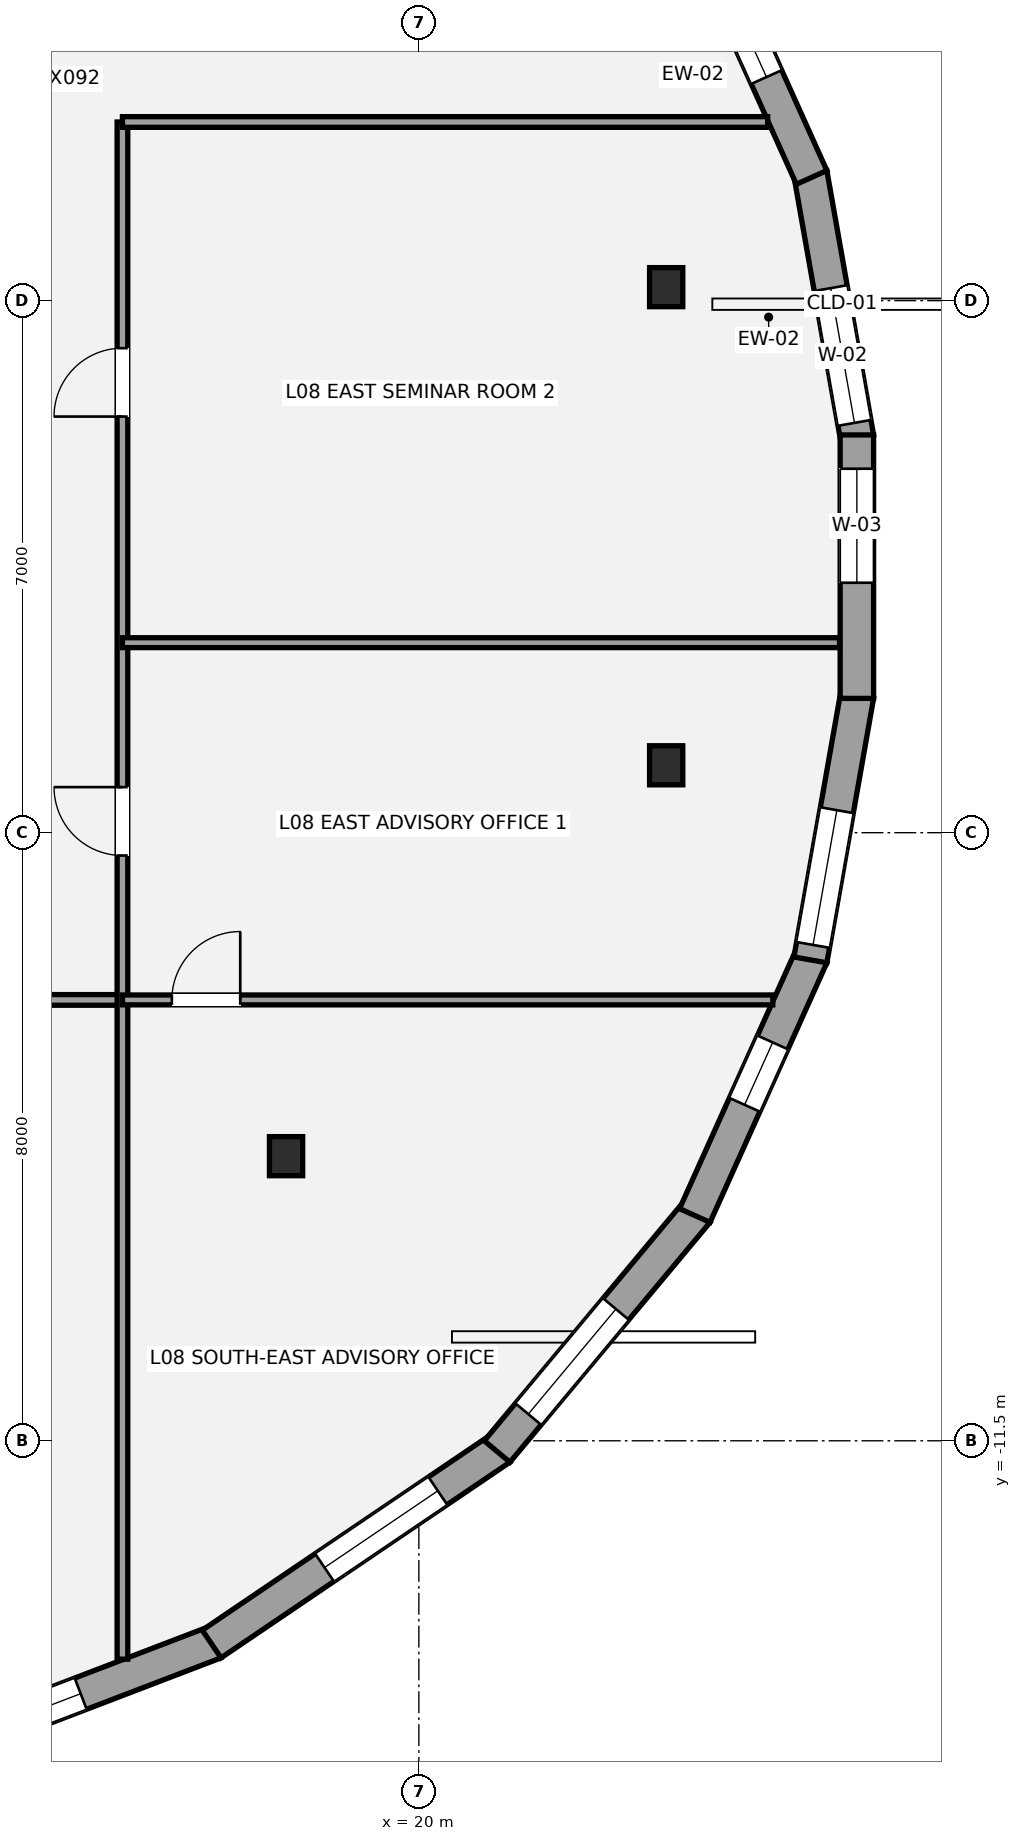
"""IFC4 building model, lengths in metres.
Left out: names, types, materials, properties, quantities, classifications, styles, units other than length and angle.
Written with IfcOpenShell. Run it as: python <this file> out.ifc"""

import sys

from ifc_helpers import new_model, si_unit, direction, frame, frame_2d, origin, origin_2d, place, context, subcontext, project, spatial, rectangle, i_section, extrude, element, fill, save


model = new_model("IFC4")
c1 = context("Model", 3, precision=1e-05, world=origin(), true_north=direction((0.0, 1.0)))
c2 = subcontext(c1, "Body", "Model", "MODEL_VIEW")
j1 = project(units=[si_unit("LENGTHUNIT", "METRE"), si_unit("PLANEANGLEUNIT", "RADIAN")], contexts=[c1])
p1 = place(None, origin())
s1 = spatial("IfcSite", under=j1, at=p1, CompositionType="ELEMENT")
p2 = place(p1, origin())
s2 = spatial("IfcBuilding", under=s1, at=p2, CompositionType="ELEMENT")
p3 = place(p2, frame((0.0, 0.0, 34.2)))
s3 = spatial("IfcBuildingStorey", under=s2, at=p3, CompositionType="ELEMENT", Elevation=34.2)
for number, where, z_axis, x_axis in (
    (1, (23.254, 3.677, 0.0), (0.0, 0.0, 1.0), (1.0, 0.0, 0.0)),
    (2, (18.253, -7.756, 0.0), (0.0, 0.0, 1.0), (1.0, 0.0, 0.0)),
    (3, (23.254, -2.613, 0.0), (0.0, 0.0, 1.0), (1.0, 0.0, 0.0)),
):
    element("IfcColumn", number, at=place(p3, frame(where, z_axis=z_axis, x_axis=x_axis)), inside=s3, PredefinedType="COLUMN", context=c2, shape_type="SweptSolid", body=[
        extrude(i_section(OverallWidth=0.437, OverallDepth=0.514, WebThickness=0.061, FlangeThickness=0.097, at=origin_2d()), origin(), (0.0, 0.0, 1.0), 3.6),
    ])
p4 = place(p3, frame((25.152, 5.173, 0.0), z_axis=(0.0, 0.0, 1.0), x_axis=(0.174041624961, -0.984738296595, 0.0)))
e4 = element("IfcWall", 4, at=p4, inside=s3, PredefinedType="STANDARD", context=c2, shape_type="SweptSolid", body=[
    extrude(rectangle(XDim=3.532, YDim=0.44, at=frame_2d((1.766, 0.0))), origin(), (0.0, 0.0, 1.0), 2.533),
])
p5 = place(p4, frame((1.532, 0.0, 0.65)))
e5 = element("IfcOpeningElement", 5, at=p5, cuts=e4, PredefinedType="OPENING", context=c2, shape_type="SweptSolid", body=[
    extrude(rectangle(XDim=1.8, YDim=1.7, at=frame_2d((0.9, 0.85))), frame((0.0, 0.23, 0.0), z_axis=(0.0, -1.0, 0.0), x_axis=(1.0, 0.0, 0.0)), (0.0, 0.0, 1.0), 0.46),
])
p6 = place(p3, frame((23.631, 8.536, 0.0), z_axis=(0.0, 0.0, 1.0), x_axis=(0.410386362845, -0.911911746383, 0.0)))
e6 = element("IfcWall", 6, at=p6, inside=s3, PredefinedType="STANDARD", context=c2, shape_type="SweptSolid", body=[
    extrude(rectangle(XDim=3.745, YDim=0.44, at=frame_2d((1.873, 0.0))), origin(), (0.0, 0.0, 1.0), 2.533),
])
p7 = place(p6, frame((1.397, 0.0, 0.92)))
e7 = element("IfcOpeningElement", 7, at=p7, cuts=e6, PredefinedType="OPENING", context=c2, shape_type="SweptSolid", body=[
    extrude(rectangle(XDim=0.9, YDim=1.35, at=frame_2d((0.45, 0.675))), frame((0.0, 0.23, 0.0), z_axis=(0.0, -1.0, 0.0), x_axis=(1.0, 0.0, 0.0)), (0.0, 0.0, 1.0), 0.46),
])
p8 = place(p3, frame((17.318, -14.15, 0.0), z_axis=(0.0, 0.0, 1.0), x_axis=(-0.933928375579, -0.357460192592, 0.0)))
e8 = element("IfcWall", 8, at=p8, inside=s3, PredefinedType="STANDARD", context=c2, shape_type="SweptSolid", body=[
    extrude(rectangle(XDim=4.989, YDim=0.44, at=frame_2d((2.494, 0.0))), origin(), (0.0, 0.0, 1.0), 2.529),
])
p9 = place(p8, frame((1.893, 0.0, 0.65)))
e9 = element("IfcOpeningElement", 9, at=p9, cuts=e8, PredefinedType="OPENING", context=c2, shape_type="SweptSolid", body=[
    extrude(rectangle(XDim=1.8, YDim=1.7, at=frame_2d((0.9, 0.85))), frame((0.0, 0.23, 0.0), z_axis=(0.0, -1.0, 0.0), x_axis=(1.0, 0.0, 0.0)), (0.0, 0.0, 1.0), 0.46),
])
p10 = place(p3, frame((21.075, -11.6, 0.0), z_axis=(0.0, 0.0, 1.0), x_axis=(-0.828003115717, -0.560723497246, 0.0)))
e10 = element("IfcWall", 10, at=p10, inside=s3, PredefinedType="STANDARD", context=c2, shape_type="SweptSolid", body=[
    extrude(rectangle(XDim=4.591, YDim=0.44, at=frame_2d((2.295, 0.0))), origin(), (0.0, 0.0, 1.0), 2.529),
])
p11 = place(p10, frame((0.997, 0.0, 0.65)))
e11 = element("IfcOpeningElement", 11, at=p11, cuts=e10, PredefinedType="OPENING", context=c2, shape_type="SweptSolid", body=[
    extrude(rectangle(XDim=1.8, YDim=1.7, at=frame_2d((0.9, 0.85))), frame((0.0, 0.23, 0.0), z_axis=(0.0, -1.0, 0.0), x_axis=(1.0, 0.0, 0.0)), (0.0, 0.0, 1.0), 0.46),
])
p12 = place(p3, frame((23.662, -8.486, 0.0), z_axis=(0.0, 0.0, 1.0), x_axis=(-0.64070435578, -0.767787684509, 0.0)))
e12 = element("IfcWall", 12, at=p12, inside=s3, PredefinedType="STANDARD", context=c2, shape_type="SweptSolid", body=[
    extrude(rectangle(XDim=4.109, YDim=0.44, at=frame_2d((2.055, 0.0))), origin(), (0.0, 0.0, 1.0), 2.533),
])
p13 = place(p12, frame((1.669, 0.0, 0.65)))
e13 = element("IfcOpeningElement", 13, at=p13, cuts=e12, PredefinedType="OPENING", context=c2, shape_type="SweptSolid", body=[
    extrude(rectangle(XDim=1.8, YDim=1.7, at=frame_2d((0.9, 0.85))), frame((0.0, 0.23, 0.0), z_axis=(0.0, -1.0, 0.0), x_axis=(1.0, 0.0, 0.0)), (0.0, 0.0, 1.0), 0.46),
])
p14 = place(p3, frame((25.167, -5.121, 0.0), z_axis=(0.0, 0.0, 1.0), x_axis=(-0.410386362845, -0.911911746383, 0.0)))
e14 = element("IfcWall", 14, at=p14, inside=s3, PredefinedType="STANDARD", context=c2, shape_type="SweptSolid", body=[
    extrude(rectangle(XDim=3.745, YDim=0.44, at=frame_2d((1.873, 0.0))), origin(), (0.0, 0.0, 1.0), 2.533),
])
p15 = place(p14, frame((1.248, 0.0, 0.58)))
e15 = element("IfcOpeningElement", 15, at=p15, cuts=e14, PredefinedType="OPENING", context=c2, shape_type="SweptSolid", body=[
    extrude(rectangle(XDim=0.9, YDim=1.35, at=frame_2d((0.45, 0.675))), frame((0.0, 0.23, 0.0), z_axis=(0.0, -1.0, 0.0), x_axis=(1.0, 0.0, 0.0)), (0.0, 0.0, 1.0), 0.46),
])
p16 = place(p3, frame((25.766, -1.695, 0.0), z_axis=(0.0, 0.0, 1.0), x_axis=(-0.174041624961, -0.984738296595, 0.0)))
e16 = element("IfcWall", 16, at=p16, inside=s3, PredefinedType="STANDARD", context=c2, shape_type="SweptSolid", body=[
    extrude(rectangle(XDim=3.532, YDim=0.44, at=frame_2d((1.766, 0.0))), origin(), (0.0, 0.0, 1.0), 2.533),
])
p17 = place(p16, frame((1.532, 0.0, 0.65)))
e17 = element("IfcOpeningElement", 17, at=p17, cuts=e16, PredefinedType="OPENING", context=c2, shape_type="SweptSolid", body=[
    extrude(rectangle(XDim=1.8, YDim=1.7, at=frame_2d((0.9, 0.85))), frame((0.0, 0.23, 0.0), z_axis=(0.0, -1.0, 0.0), x_axis=(1.0, 0.0, 0.0)), (0.0, 0.0, 1.0), 0.46),
])
p18 = place(p3, frame((25.763, 1.733, 0.0), z_axis=(0.0, 0.0, 1.0), x_axis=(0.0, -1.0, 0.0)))
e18 = element("IfcWall", 18, at=p18, inside=s3, PredefinedType="STANDARD", context=c2, shape_type="SweptSolid", body=[
    extrude(rectangle(XDim=3.466, YDim=0.44, at=frame_2d((1.733, 0.0))), origin(), (0.0, 0.0, 1.0), 2.533),
])
p19 = place(p18, frame((0.445, 0.0, 0.65)))
e19 = element("IfcOpeningElement", 19, at=p19, cuts=e18, PredefinedType="OPENING", context=c2, shape_type="SweptSolid", body=[
    extrude(rectangle(XDim=1.5, YDim=1.7, at=frame_2d((0.75, 0.85))), frame((0.0, 0.23, 0.0), z_axis=(0.0, -1.0, 0.0), x_axis=(1.0, 0.0, 0.0)), (0.0, 0.0, 1.0), 0.46),
])
p20 = place(p3, frame((-16.1, -5.7, 0.0), z_axis=(0.0, 0.0, 1.0), x_axis=(1.0, 0.0, 0.0)))
e20 = element("IfcWall", 20, at=p20, inside=s3, PredefinedType="PARTITIONING", context=c2, shape_type="SweptSolid", body=[
    extrude(rectangle(XDim=32.2, YDim=0.14, at=frame_2d((16.1, 0.0))), origin(), (0.0, 0.0, 1.0), 2.853),
])
p21 = place(p20, frame((3.6, 0.0, 0.0)))
e21 = element("IfcOpeningElement", 21, at=p21, cuts=e20, PredefinedType="OPENING", context=c2, shape_type="SweptSolid", body=[
    extrude(rectangle(XDim=0.9, YDim=2.1, at=frame_2d((0.45, 1.05))), frame((0.0, 0.08, 0.0), z_axis=(0.0, -1.0, 0.0), x_axis=(1.0, 0.0, 0.0)), (0.0, 0.0, 1.0), 0.16),
])
p22 = place(p20, frame((11.35, 0.0, 0.0)))
e22 = element("IfcOpeningElement", 22, at=p22, cuts=e20, PredefinedType="OPENING", context=c2, shape_type="SweptSolid", body=[
    extrude(rectangle(XDim=1.5, YDim=2.15, at=frame_2d((0.75, 1.075))), frame((0.0, 0.08, 0.0), z_axis=(0.0, -1.0, 0.0), x_axis=(1.0, 0.0, 0.0)), (0.0, 0.0, 1.0), 0.16),
])
p23 = place(p20, frame((19.65, 0.0, 0.0)))
e23 = element("IfcOpeningElement", 23, at=p23, cuts=e20, PredefinedType="OPENING", context=c2, shape_type="SweptSolid", body=[
    extrude(rectangle(XDim=0.9, YDim=2.1, at=frame_2d((0.45, 1.05))), frame((0.0, 0.08, 0.0), z_axis=(0.0, -1.0, 0.0), x_axis=(1.0, 0.0, 0.0)), (0.0, 0.0, 1.0), 0.16),
])
p24 = place(p20, frame((27.7, 0.0, 0.0)))
e24 = element("IfcOpeningElement", 24, at=p24, cuts=e20, PredefinedType="OPENING", context=c2, shape_type="SweptSolid", body=[
    extrude(rectangle(XDim=0.9, YDim=2.1, at=frame_2d((0.45, 1.05))), frame((0.0, 0.08, 0.0), z_axis=(0.0, -1.0, 0.0), x_axis=(1.0, 0.0, 0.0)), (0.0, 0.0, 1.0), 0.16),
])
p25 = place(p3, frame((16.1, -14.373, 0.0), z_axis=(0.0, 0.0, 1.0), x_axis=(0.0, 1.0, 0.0)))
e25 = element("IfcWall", 25, at=p25, inside=s3, PredefinedType="PARTITIONING", context=c2, shape_type="SweptSolid", body=[
    extrude(rectangle(XDim=20.223, YDim=0.14, at=frame_2d((10.111, 0.0))), origin(), (0.0, 0.0, 1.0), 2.841),
])
p26 = place(p25, frame((10.573, 0.0, 0.0)))
e26 = element("IfcOpeningElement", 26, at=p26, cuts=e25, PredefinedType="OPENING", context=c2, shape_type="SweptSolid", body=[
    extrude(rectangle(XDim=0.9, YDim=2.1, at=frame_2d((0.45, 1.05))), frame((0.0, 0.08, 0.0), z_axis=(0.0, -1.0, 0.0), x_axis=(1.0, 0.0, 0.0)), (0.0, 0.0, 1.0), 0.16),
])
p27 = place(p25, frame((16.347, 0.0, 0.0)))
e27 = element("IfcOpeningElement", 27, at=p27, cuts=e25, PredefinedType="OPENING", context=c2, shape_type="SweptSolid", body=[
    extrude(rectangle(XDim=0.9, YDim=2.1, at=frame_2d((0.45, 1.05))), frame((0.0, 0.08, 0.0), z_axis=(0.0, -1.0, 0.0), x_axis=(1.0, 0.0, 0.0)), (0.0, 0.0, 1.0), 0.16),
])
p28 = place(p3, frame((16.1, 5.85, 0.0), z_axis=(0.0, 0.0, 1.0), x_axis=(1.0, 0.0, 0.0)))
e28 = element("IfcWall", 28, at=p28, inside=s3, PredefinedType="PARTITIONING", context=c2, shape_type="SweptSolid", body=[
    extrude(rectangle(XDim=8.49, YDim=0.14, at=frame_2d((4.245, 0.0))), origin(), (0.0, 0.0, 1.0), 3.4),
])
p29 = place(p3, frame((16.1, -5.7, 0.0), z_axis=(0.0, 0.0, 1.0), x_axis=(1.0, 0.0, 0.0)))
e29 = element("IfcWall", 29, at=p29, inside=s3, PredefinedType="PARTITIONING", context=c2, shape_type="SweptSolid", body=[
    extrude(rectangle(XDim=8.557, YDim=0.13, at=frame_2d((4.278, 0.0))), origin(), (0.0, 0.0, 1.0), 2.779),
])
p30 = place(p29, frame((0.65, 0.0, 0.0)))
e30 = element("IfcOpeningElement", 30, at=p30, cuts=e29, PredefinedType="OPENING", context=c2, shape_type="SweptSolid", body=[
    extrude(rectangle(XDim=0.9, YDim=2.1, at=frame_2d((0.45, 1.05))), frame((0.0, 0.075, 0.0), z_axis=(0.0, -1.0, 0.0), x_axis=(1.0, 0.0, 0.0)), (0.0, 0.0, 1.0), 0.15),
])
p31 = place(p3, frame((16.1, -1.0, 0.0), z_axis=(0.0, 0.0, 1.0), x_axis=(1.0, 0.0, 0.0)))
e31 = element("IfcWall", 31, at=p31, inside=s3, PredefinedType="PARTITIONING", context=c2, shape_type="SweptSolid", body=[
    extrude(rectangle(XDim=9.435, YDim=0.13, at=frame_2d((4.717, 0.0))), origin(), (0.0, 0.0, 1.0), 2.841),
])
p32 = place(p5, origin())
e32 = element("IfcWindow", 32, at=p32, inside=s3, PartitioningType="SINGLE_PANEL", PredefinedType="WINDOW", context=c2, shape_type="SweptSolid", body=[
    extrude(rectangle(XDim=1.8, YDim=1.7, at=frame_2d((0.9, 0.85))), frame((0.0, -0.01, 0.0), z_axis=(0.0, -1.0, 0.0), x_axis=(1.0, 0.0, 0.0)), (0.0, 0.0, 1.0), 0.06),
])
fill(e5, e32)
p33 = place(p7, origin())
e33 = element("IfcWindow", 33, at=p33, inside=s3, PartitioningType="SINGLE_PANEL", PredefinedType="WINDOW", context=c2, shape_type="SweptSolid", body=[
    extrude(rectangle(XDim=0.9, YDim=1.35, at=frame_2d((0.45, 0.675))), frame((0.0, -0.01, 0.0), z_axis=(0.0, -1.0, 0.0), x_axis=(1.0, 0.0, 0.0)), (0.0, 0.0, 1.0), 0.06),
])
fill(e7, e33)
p34 = place(p9, origin())
e34 = element("IfcWindow", 34, at=p34, inside=s3, PartitioningType="SINGLE_PANEL", PredefinedType="WINDOW", context=c2, shape_type="SweptSolid", body=[
    extrude(rectangle(XDim=1.8, YDim=1.7, at=frame_2d((0.9, 0.85))), frame((0.0, -0.01, 0.0), z_axis=(0.0, -1.0, 0.0), x_axis=(1.0, 0.0, 0.0)), (0.0, 0.0, 1.0), 0.06),
])
fill(e9, e34)
p35 = place(p11, origin())
e35 = element("IfcWindow", 35, at=p35, inside=s3, PartitioningType="SINGLE_PANEL", PredefinedType="WINDOW", context=c2, shape_type="SweptSolid", body=[
    extrude(rectangle(XDim=1.8, YDim=1.7, at=frame_2d((0.9, 0.85))), frame((0.0, -0.01, 0.0), z_axis=(0.0, -1.0, 0.0), x_axis=(1.0, 0.0, 0.0)), (0.0, 0.0, 1.0), 0.06),
])
fill(e11, e35)
p36 = place(p13, origin())
e36 = element("IfcWindow", 36, at=p36, inside=s3, PartitioningType="SINGLE_PANEL", PredefinedType="WINDOW", context=c2, shape_type="SweptSolid", body=[
    extrude(rectangle(XDim=1.8, YDim=1.7, at=frame_2d((0.9, 0.85))), frame((0.0, -0.01, 0.0), z_axis=(0.0, -1.0, 0.0), x_axis=(1.0, 0.0, 0.0)), (0.0, 0.0, 1.0), 0.06),
])
fill(e13, e36)
p37 = place(p15, origin())
e37 = element("IfcWindow", 37, at=p37, inside=s3, PartitioningType="SINGLE_PANEL", PredefinedType="WINDOW", context=c2, shape_type="SweptSolid", body=[
    extrude(rectangle(XDim=0.9, YDim=1.35, at=frame_2d((0.45, 0.675))), frame((0.0, -0.01, 0.0), z_axis=(0.0, -1.0, 0.0), x_axis=(1.0, 0.0, 0.0)), (0.0, 0.0, 1.0), 0.06),
])
fill(e15, e37)
p38 = place(p17, origin())
e38 = element("IfcWindow", 38, at=p38, inside=s3, PartitioningType="SINGLE_PANEL", PredefinedType="WINDOW", context=c2, shape_type="SweptSolid", body=[
    extrude(rectangle(XDim=1.8, YDim=1.7, at=frame_2d((0.9, 0.85))), frame((0.0, -0.01, 0.0), z_axis=(0.0, -1.0, 0.0), x_axis=(1.0, 0.0, 0.0)), (0.0, 0.0, 1.0), 0.06),
])
fill(e17, e38)
p39 = place(p19, origin())
e39 = element("IfcWindow", 39, at=p39, inside=s3, PartitioningType="SINGLE_PANEL", PredefinedType="WINDOW", context=c2, shape_type="SweptSolid", body=[
    extrude(rectangle(XDim=1.5, YDim=1.7, at=frame_2d((0.75, 0.85))), frame((0.0, -0.01, 0.0), z_axis=(0.0, -1.0, 0.0), x_axis=(1.0, 0.0, 0.0)), (0.0, 0.0, 1.0), 0.06),
])
fill(e19, e39)
p40 = place(p30, origin())
e40 = element("IfcDoor", 40, at=p40, inside=s3, OperationType="SINGLE_SWING_RIGHT", PredefinedType="DOOR", context=c2, shape_type="SweptSolid", body=[
    extrude(rectangle(XDim=0.9, YDim=2.1, at=frame_2d((0.45, 1.05))), frame((0.0, 0.025, 0.0), z_axis=(0.0, -1.0, 0.0), x_axis=(1.0, 0.0, 0.0)), (0.0, 0.0, 1.0), 0.05),
])
fill(e30, e40)
p41 = place(p26, origin())
e41 = element("IfcDoor", 41, at=p41, inside=s3, OperationType="SINGLE_SWING_RIGHT", PredefinedType="DOOR", context=c2, shape_type="SweptSolid", body=[
    extrude(rectangle(XDim=0.9, YDim=2.1, at=frame_2d((0.45, 1.05))), frame((0.0, 0.025, 0.0), z_axis=(0.0, -1.0, 0.0), x_axis=(1.0, 0.0, 0.0)), (0.0, 0.0, 1.0), 0.05),
])
fill(e26, e41)
p42 = place(p27, origin())
e42 = element("IfcDoor", 42, at=p42, inside=s3, OperationType="SINGLE_SWING_LEFT", PredefinedType="DOOR", context=c2, shape_type="SweptSolid", body=[
    extrude(rectangle(XDim=0.9, YDim=2.1, at=frame_2d((0.45, 1.05))), frame((0.0, 0.025, 0.0), z_axis=(0.0, -1.0, 0.0), x_axis=(1.0, 0.0, 0.0)), (0.0, 0.0, 1.0), 0.05),
])
fill(e27, e42)
save(model, sys.argv[1])
